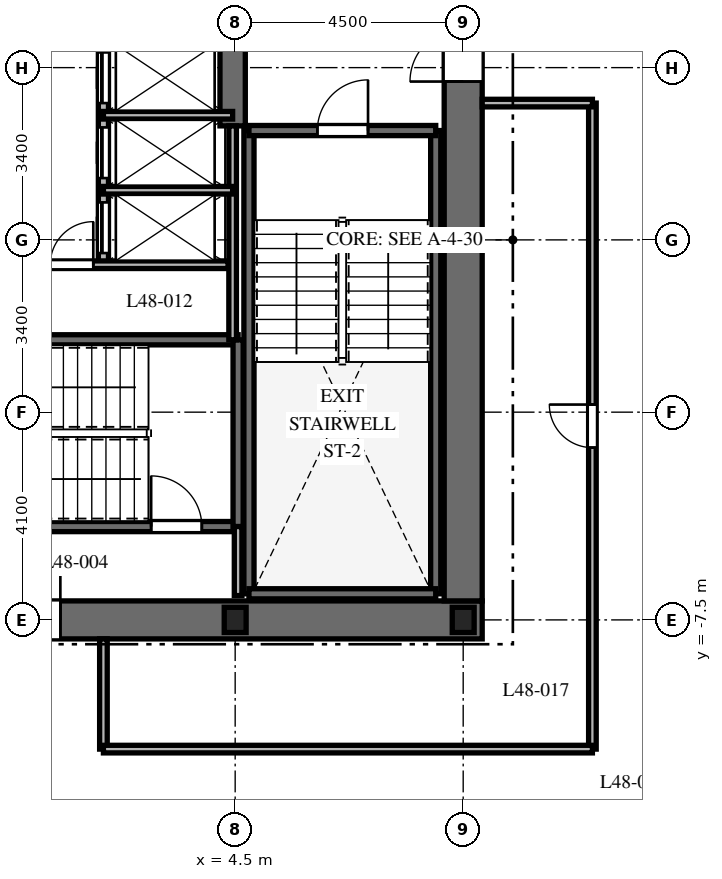
"""IFC4 building model, lengths in metres.
Left out: names, types, materials, properties, quantities, classifications, styles, units other than length and angle.
Written with IfcOpenShell. Run it as: python <this file> out.ifc"""

import sys

from ifc_helpers import new_model, si_unit, direction, frame, frame_2d, origin, origin_2d, place, context, subcontext, project, spatial, rectangle, i_section, extrude, element, fill, save


model = new_model("IFC4")
c1 = context("Model", 3, precision=1e-05, world=origin(), true_north=direction((0.0, 1.0)))
c2 = subcontext(c1, "Body", "Model", "MODEL_VIEW")
j1 = project(units=[si_unit("LENGTHUNIT", "METRE"), si_unit("PLANEANGLEUNIT", "RADIAN")], contexts=[c1])
p1 = place(None, origin())
s1 = spatial("IfcSite", under=j1, at=p1, CompositionType="ELEMENT")
p2 = place(p1, origin())
s2 = spatial("IfcBuilding", under=s1, at=p2, CompositionType="ELEMENT")
p3 = place(p2, frame((0.0, 0.0, 194.1)))
s3 = spatial("IfcBuildingStorey", under=s2, at=p3, CompositionType="ELEMENT", Elevation=194.1)
p4 = place(p3, frame((-9.375, -7.5, 0.0), z_axis=(0.0, 0.0, 1.0), x_axis=(1.0, 0.0, 0.0)))
e1 = element("IfcWall", 1, at=p4, inside=s3, PredefinedType="SHEAR", context=c2, shape_type="SweptSolid", body=[
    extrude(rectangle(XDim=18.75, YDim=0.75, at=frame_2d((9.375, 0.0))), origin(), (0.0, 0.0, 1.0), 3.7),
])
p5 = place(p4, frame((9.425, 0.0, 0.0)))
e2 = element("IfcOpeningElement", 2, at=p5, cuts=e1, PredefinedType="OPENING", context=c2, shape_type="SweptSolid", body=[
    extrude(rectangle(XDim=1.0, YDim=2.15, at=frame_2d((0.5, 1.075))), frame((0.0, 0.385, 0.0), z_axis=(0.0, -1.0, 0.0), x_axis=(1.0, 0.0, 0.0)), (0.0, 0.0, 1.0), 0.77),
])
p6 = place(p3, frame((9.0, -7.125, 0.0), z_axis=(0.0, 0.0, 1.0), x_axis=(0.0, 1.0, 0.0)))
e3 = element("IfcWall", 3, at=p6, inside=s3, PredefinedType="SHEAR", context=c2, shape_type="SweptSolid", body=[
    extrude(rectangle(XDim=14.25, YDim=0.75, at=frame_2d((7.125, 0.0))), origin(), (0.0, 0.0, 1.0), 3.7),
])
p7 = place(p6, frame((10.25, 0.0, 0.0)))
e4 = element("IfcOpeningElement", 4, at=p7, cuts=e3, PredefinedType="OPENING", context=c2, shape_type="SweptSolid", body=[
    extrude(rectangle(XDim=1.05, YDim=2.15, at=frame_2d((0.525, 1.075))), frame((0.0, 0.385, 0.0), z_axis=(0.0, -1.0, 0.0), x_axis=(1.0, 0.0, 0.0)), (0.0, 0.0, 1.0), 0.77),
])
p8 = place(p3, frame((4.45, 2.25, 0.0), z_axis=(0.0, 0.0, 1.0), x_axis=(0.0, 1.0, 0.0)))
e5 = element("IfcWall", 5, at=p8, inside=s3, PredefinedType="SHEAR", context=c2, shape_type="SweptSolid", body=[
    extrude(rectangle(XDim=4.875, YDim=0.5, at=frame_2d((2.438, 0.0))), origin(), (0.0, 0.0, 1.0), 3.7),
])
for number, where, z_axis, x_axis in (
    (6, (4.772, -6.985, 0.0), (0.0, 0.0, 1.0), (0.0, 1.0, 0.0)),
    (7, (8.458, -6.985, 0.0), (0.0, 0.0, 1.0), (0.0, 1.0, 0.0)),
):
    element("IfcWall", number, at=place(p3, frame(where, z_axis=z_axis, x_axis=x_axis)), inside=s3, PredefinedType="SHEAR", context=c2, shape_type="SweptSolid", body=[
        extrude(rectangle(XDim=9.143, YDim=0.2, at=frame_2d((4.572, 0.0))), origin(), (0.0, 0.0, 1.0), 3.7),
    ])
p9 = place(p3, frame((4.772, -6.985, 0.0), z_axis=(0.0, 0.0, 1.0), x_axis=(1.0, 0.0, 0.0)))
e8 = element("IfcWall", 8, at=p9, inside=s3, PredefinedType="SHEAR", context=c2, shape_type="SweptSolid", body=[
    extrude(rectangle(XDim=3.686, YDim=0.2, at=frame_2d((1.843, 0.0))), origin(), (0.0, 0.0, 1.0), 3.7),
])
p10 = place(p3, frame((4.772, 2.158, 0.0), z_axis=(0.0, 0.0, 1.0), x_axis=(1.0, 0.0, 0.0)))
e9 = element("IfcWall", 9, at=p10, inside=s3, PredefinedType="SHEAR", context=c2, shape_type="SweptSolid", body=[
    extrude(rectangle(XDim=3.686, YDim=0.2, at=frame_2d((1.843, 0.0))), origin(), (0.0, 0.0, 1.0), 3.7),
])
p11 = place(p10, frame((1.35, 0.0, 0.0)))
e10 = element("IfcOpeningElement", 10, at=p11, cuts=e9, PredefinedType="OPENING", context=c2, shape_type="SweptSolid", body=[
    extrude(rectangle(XDim=1.0, YDim=2.15, at=frame_2d((0.5, 1.075))), frame((0.0, 0.11, 0.0), z_axis=(0.0, -1.0, 0.0), x_axis=(1.0, 0.0, 0.0)), (0.0, 0.0, 1.0), 0.22),
])
p12 = place(p3, frame((-4.608, -5.658, 0.0), z_axis=(0.0, 0.0, 1.0), x_axis=(1.0, 0.0, 0.0)))
e11 = element("IfcWall", 11, at=p12, inside=s3, PredefinedType="SHEAR", context=c2, shape_type="SweptSolid", body=[
    extrude(rectangle(XDim=9.166, YDim=0.2, at=frame_2d((4.583, 0.0))), origin(), (0.0, 0.0, 1.0), 3.7),
])
p13 = place(p12, frame((7.45, 0.0, 0.0)))
e12 = element("IfcOpeningElement", 12, at=p13, cuts=e11, PredefinedType="OPENING", context=c2, shape_type="SweptSolid", body=[
    extrude(rectangle(XDim=1.0, YDim=2.15, at=frame_2d((0.5, 1.075))), frame((0.0, 0.11, 0.0), z_axis=(0.0, -1.0, 0.0), x_axis=(1.0, 0.0, 0.0)), (0.0, 0.0, 1.0), 0.22),
])
p14 = place(p3, frame((-4.608, -1.972, 0.0), z_axis=(0.0, 0.0, 1.0), x_axis=(1.0, 0.0, 0.0)))
e13 = element("IfcWall", 13, at=p14, inside=s3, PredefinedType="SHEAR", context=c2, shape_type="SweptSolid", body=[
    extrude(rectangle(XDim=9.166, YDim=0.2, at=frame_2d((4.583, 0.0))), origin(), (0.0, 0.0, 1.0), 3.7),
])
p15 = place(p3, frame((4.558, -5.658, 0.0), z_axis=(0.0, 0.0, 1.0), x_axis=(0.0, 1.0, 0.0)))
e14 = element("IfcWall", 14, at=p15, inside=s3, PredefinedType="SHEAR", context=c2, shape_type="SweptSolid", body=[
    extrude(rectangle(XDim=3.686, YDim=0.2, at=frame_2d((1.843, 0.0))), origin(), (0.0, 0.0, 1.0), 3.7),
])
for number, where, z_axis, x_axis in (
    (15, (4.5, -7.5, 0.0), (0.0, 0.0, 1.0), (1.0, 0.0, 0.0)),
    (16, (9.0, -7.5, 0.0), (0.0, 0.0, 1.0), (1.0, 0.0, 0.0)),
):
    element("IfcColumn", number, at=place(p3, frame(where, z_axis=z_axis, x_axis=x_axis)), inside=s3, PredefinedType="COLUMN", context=c2, shape_type="SweptSolid", body=[
        extrude(i_section(OverallWidth=0.432, OverallDepth=0.498, WebThickness=0.056, FlangeThickness=0.089, at=origin_2d()), origin(), (0.0, 0.0, 1.0), 3.7),
    ])
p16 = place(p3, frame((4.558, -7.02, 0.0), z_axis=(0.0, 0.0, 1.0), x_axis=(0.0, 1.0, 0.0)))
e17 = element("IfcWall", 17, at=p16, inside=s3, PredefinedType="PARTITIONING", context=c2, shape_type="SweptSolid", body=[
    extrude(rectangle(XDim=1.362, YDim=0.15, at=frame_2d((0.681, 0.0))), origin(), (0.0, 0.0, 1.0), 3.4),
])
p17 = place(p3, frame((4.45, -1.972, 0.0), z_axis=(0.0, 0.0, 1.0), x_axis=(0.0, 1.0, 0.0)))
e18 = element("IfcWall", 18, at=p17, inside=s3, PredefinedType="PARTITIONING", context=c2, shape_type="SweptSolid", body=[
    extrude(rectangle(XDim=4.222, YDim=0.15, at=frame_2d((2.111, 0.0))), origin(), (0.0, 0.0, 1.0), 3.4),
])
p18 = place(p3, frame((1.9, -0.5, 0.0), z_axis=(0.0, 0.0, 1.0), x_axis=(0.0, 1.0, 0.0)))
e19 = element("IfcWall", 19, at=p18, inside=s3, PredefinedType="PARTITIONING", context=c2, shape_type="SweptSolid", body=[
    extrude(rectangle(XDim=4.44, YDim=0.2, at=frame_2d((2.22, 0.0))), origin(), (0.0, 0.0, 1.0), 3.4),
])
p19 = place(p18, frame((0.24, 0.0, 0.0)))
e20 = element("IfcOpeningElement", 20, at=p19, cuts=e19, PredefinedType="OPENING", context=c2, shape_type="SweptSolid", body=[
    extrude(rectangle(XDim=1.0, YDim=2.2, at=frame_2d((0.5, 1.1))), frame((0.0, 0.11, 0.0), z_axis=(0.0, -1.0, 0.0), x_axis=(1.0, 0.0, 0.0)), (0.0, 0.0, 1.0), 0.22),
])
p20 = place(p18, frame((1.72, 0.0, 0.0)))
e21 = element("IfcOpeningElement", 21, at=p20, cuts=e19, PredefinedType="OPENING", context=c2, shape_type="SweptSolid", body=[
    extrude(rectangle(XDim=1.0, YDim=2.2, at=frame_2d((0.5, 1.1))), frame((0.0, 0.11, 0.0), z_axis=(0.0, -1.0, 0.0), x_axis=(1.0, 0.0, 0.0)), (0.0, 0.0, 1.0), 0.22),
])
p21 = place(p18, frame((3.2, 0.0, 0.0)))
e22 = element("IfcOpeningElement", 22, at=p21, cuts=e19, PredefinedType="OPENING", context=c2, shape_type="SweptSolid", body=[
    extrude(rectangle(XDim=1.0, YDim=2.2, at=frame_2d((0.5, 1.1))), frame((0.0, 0.11, 0.0), z_axis=(0.0, -1.0, 0.0), x_axis=(1.0, 0.0, 0.0)), (0.0, 0.0, 1.0), 0.22),
])
for number, where, z_axis, x_axis in (
    (23, (1.9, 0.98, 0.0), (0.0, 0.0, 1.0), (1.0, 0.0, 0.0)),
    (24, (1.9, 2.46, 0.0), (0.0, 0.0, 1.0), (1.0, 0.0, 0.0)),
):
    element("IfcWall", number, at=place(p3, frame(where, z_axis=z_axis, x_axis=x_axis)), inside=s3, PredefinedType="PARTITIONING", context=c2, shape_type="SweptSolid", body=[
        extrude(rectangle(XDim=2.55, YDim=0.15, at=frame_2d((1.275, 0.0))), origin(), (0.0, 0.0, 1.0), 3.4),
    ])
p22 = place(p3, frame((-4.36, -0.49, 0.0), z_axis=(0.0, 0.0, 1.0), x_axis=(1.0, 0.0, 0.0)))
e25 = element("IfcWall", 25, at=p22, inside=s3, PredefinedType="PARTITIONING", context=c2, shape_type="SweptSolid", body=[
    extrude(rectangle(XDim=8.72, YDim=0.15, at=frame_2d((4.36, 0.0))), origin(), (0.0, 0.0, 1.0), 3.4),
])
p23 = place(p22, frame((3.16, 0.0, 0.0)))
e26 = element("IfcOpeningElement", 26, at=p23, cuts=e25, PredefinedType="OPENING", context=c2, shape_type="SweptSolid", body=[
    extrude(rectangle(XDim=0.85, YDim=2.03, at=frame_2d((0.425, 1.015))), frame((0.0, 0.085, 0.0), z_axis=(0.0, -1.0, 0.0), x_axis=(1.0, 0.0, 0.0)), (0.0, 0.0, 1.0), 0.17),
])
p24 = place(p22, frame((5.21, 0.0, 0.0)))
e27 = element("IfcOpeningElement", 27, at=p24, cuts=e25, PredefinedType="OPENING", context=c2, shape_type="SweptSolid", body=[
    extrude(rectangle(XDim=0.85, YDim=2.03, at=frame_2d((0.425, 1.015))), frame((0.0, 0.085, 0.0), z_axis=(0.0, -1.0, 0.0), x_axis=(1.0, 0.0, 0.0)), (0.0, 0.0, 1.0), 0.17),
])
p25 = place(p3, frame((11.55, -10.05, 0.0), z_axis=(0.0, 0.0, 1.0), x_axis=(0.0, 1.0, 0.0)))
e28 = element("IfcWall", 28, at=p25, inside=s3, PredefinedType="PARTITIONING", context=c2, shape_type="SweptSolid", body=[
    extrude(rectangle(XDim=12.75, YDim=0.15, at=frame_2d((6.375, 0.0))), origin(), (0.0, 0.0, 1.0), 2.84),
])
p26 = place(p25, frame((5.95, 0.0, 0.0)))
e29 = element("IfcOpeningElement", 29, at=p26, cuts=e28, PredefinedType="OPENING", context=c2, shape_type="SweptSolid", body=[
    extrude(rectangle(XDim=0.85, YDim=2.03, at=frame_2d((0.425, 1.015))), frame((0.0, 0.085, 0.0), z_axis=(0.0, -1.0, 0.0), x_axis=(1.0, 0.0, 0.0)), (0.0, 0.0, 1.0), 0.17),
])
for number, where, z_axis, x_axis in (
    (30, (11.55, 2.7, 0.0), (0.0, 0.0, 1.0), (-1.0, 0.0, 0.0)),
    (31, (1.9, -7.875, 0.0), (0.0, 0.0, 1.0), (0.0, -1.0, 0.0)),
):
    element("IfcWall", number, at=place(p3, frame(where, z_axis=z_axis, x_axis=x_axis)), inside=s3, PredefinedType="PARTITIONING", context=c2, shape_type="SweptSolid", body=[
        extrude(rectangle(XDim=2.175, YDim=0.15, at=frame_2d((1.087, 0.0))), origin(), (0.0, 0.0, 1.0), 3.4),
    ])
p27 = place(p3, frame((1.9, -10.05, 0.0), z_axis=(0.0, 0.0, 1.0), x_axis=(1.0, 0.0, 0.0)))
e32 = element("IfcWall", 32, at=p27, inside=s3, PredefinedType="PARTITIONING", context=c2, shape_type="SweptSolid", body=[
    extrude(rectangle(XDim=9.65, YDim=0.15, at=frame_2d((4.825, 0.0))), origin(), (0.0, 0.0, 1.0), 2.84),
])
p28 = place(p11, origin())
e33 = element("IfcDoor", 33, at=p28, inside=s3, OperationType="SINGLE_SWING_RIGHT", PredefinedType="DOOR", context=c2, shape_type="SweptSolid", body=[
    extrude(rectangle(XDim=1.0, YDim=2.15, at=frame_2d((0.5, 1.075))), frame((0.0, 0.025, 0.0), z_axis=(0.0, -1.0, 0.0), x_axis=(1.0, 0.0, 0.0)), (0.0, 0.0, 1.0), 0.05),
])
fill(e10, e33)
p29 = place(p13, origin())
e34 = element("IfcDoor", 34, at=p29, inside=s3, OperationType="SINGLE_SWING_LEFT", PredefinedType="DOOR", context=c2, shape_type="SweptSolid", body=[
    extrude(rectangle(XDim=1.0, YDim=2.15, at=frame_2d((0.5, 1.075))), frame((0.0, 0.025, 0.0), z_axis=(0.0, -1.0, 0.0), x_axis=(1.0, 0.0, 0.0)), (0.0, 0.0, 1.0), 0.05),
])
fill(e12, e34)
p30 = place(p5, origin())
e35 = element("IfcDoor", 35, at=p30, inside=s3, OperationType="SINGLE_SWING_RIGHT", PredefinedType="DOOR", context=c2, shape_type="SweptSolid", body=[
    extrude(rectangle(XDim=1.0, YDim=2.15, at=frame_2d((0.5, 1.075))), frame((0.0, 0.025, 0.0), z_axis=(0.0, -1.0, 0.0), x_axis=(1.0, 0.0, 0.0)), (0.0, 0.0, 1.0), 0.05),
])
fill(e2, e35)
p31 = place(p7, origin())
e36 = element("IfcDoor", 36, at=p31, inside=s3, OperationType="SINGLE_SWING_LEFT", PredefinedType="DOOR", context=c2, shape_type="SweptSolid", body=[
    extrude(rectangle(XDim=1.05, YDim=2.15, at=frame_2d((0.525, 1.075))), frame((0.0, 0.025, 0.0), z_axis=(0.0, -1.0, 0.0), x_axis=(1.0, 0.0, 0.0)), (0.0, 0.0, 1.0), 0.05),
])
fill(e4, e36)
p32 = place(p19, origin())
e37 = element("IfcDoor", 37, at=p32, inside=s3, OperationType="SLIDING_TO_RIGHT", PredefinedType="DOOR", context=c2, shape_type="SweptSolid", body=[
    extrude(rectangle(XDim=1.0, YDim=2.2, at=frame_2d((0.5, 1.1))), frame((0.0, 0.025, 0.0), z_axis=(0.0, -1.0, 0.0), x_axis=(1.0, 0.0, 0.0)), (0.0, 0.0, 1.0), 0.05),
])
fill(e20, e37)
p33 = place(p20, origin())
e38 = element("IfcDoor", 38, at=p33, inside=s3, OperationType="SLIDING_TO_RIGHT", PredefinedType="DOOR", context=c2, shape_type="SweptSolid", body=[
    extrude(rectangle(XDim=1.0, YDim=2.2, at=frame_2d((0.5, 1.1))), frame((0.0, 0.025, 0.0), z_axis=(0.0, -1.0, 0.0), x_axis=(1.0, 0.0, 0.0)), (0.0, 0.0, 1.0), 0.05),
])
fill(e21, e38)
p34 = place(p21, origin())
e39 = element("IfcDoor", 39, at=p34, inside=s3, OperationType="SLIDING_TO_RIGHT", PredefinedType="DOOR", context=c2, shape_type="SweptSolid", body=[
    extrude(rectangle(XDim=1.0, YDim=2.2, at=frame_2d((0.5, 1.1))), frame((0.0, 0.025, 0.0), z_axis=(0.0, -1.0, 0.0), x_axis=(1.0, 0.0, 0.0)), (0.0, 0.0, 1.0), 0.05),
])
fill(e22, e39)
p35 = place(p24, origin())
e40 = element("IfcDoor", 40, at=p35, inside=s3, OperationType="SINGLE_SWING_RIGHT", PredefinedType="DOOR", context=c2, shape_type="SweptSolid", body=[
    extrude(rectangle(XDim=0.85, YDim=2.03, at=frame_2d((0.425, 1.015))), frame((0.0, 0.025, 0.0), z_axis=(0.0, -1.0, 0.0), x_axis=(1.0, 0.0, 0.0)), (0.0, 0.0, 1.0), 0.05),
])
fill(e27, e40)
p36 = place(p26, origin())
e41 = element("IfcDoor", 41, at=p36, inside=s3, OperationType="SINGLE_SWING_RIGHT", PredefinedType="DOOR", context=c2, shape_type="SweptSolid", body=[
    extrude(rectangle(XDim=0.85, YDim=2.03, at=frame_2d((0.425, 1.015))), frame((0.0, 0.025, 0.0), z_axis=(0.0, -1.0, 0.0), x_axis=(1.0, 0.0, 0.0)), (0.0, 0.0, 1.0), 0.05),
])
fill(e29, e41)
save(model, sys.argv[1])
